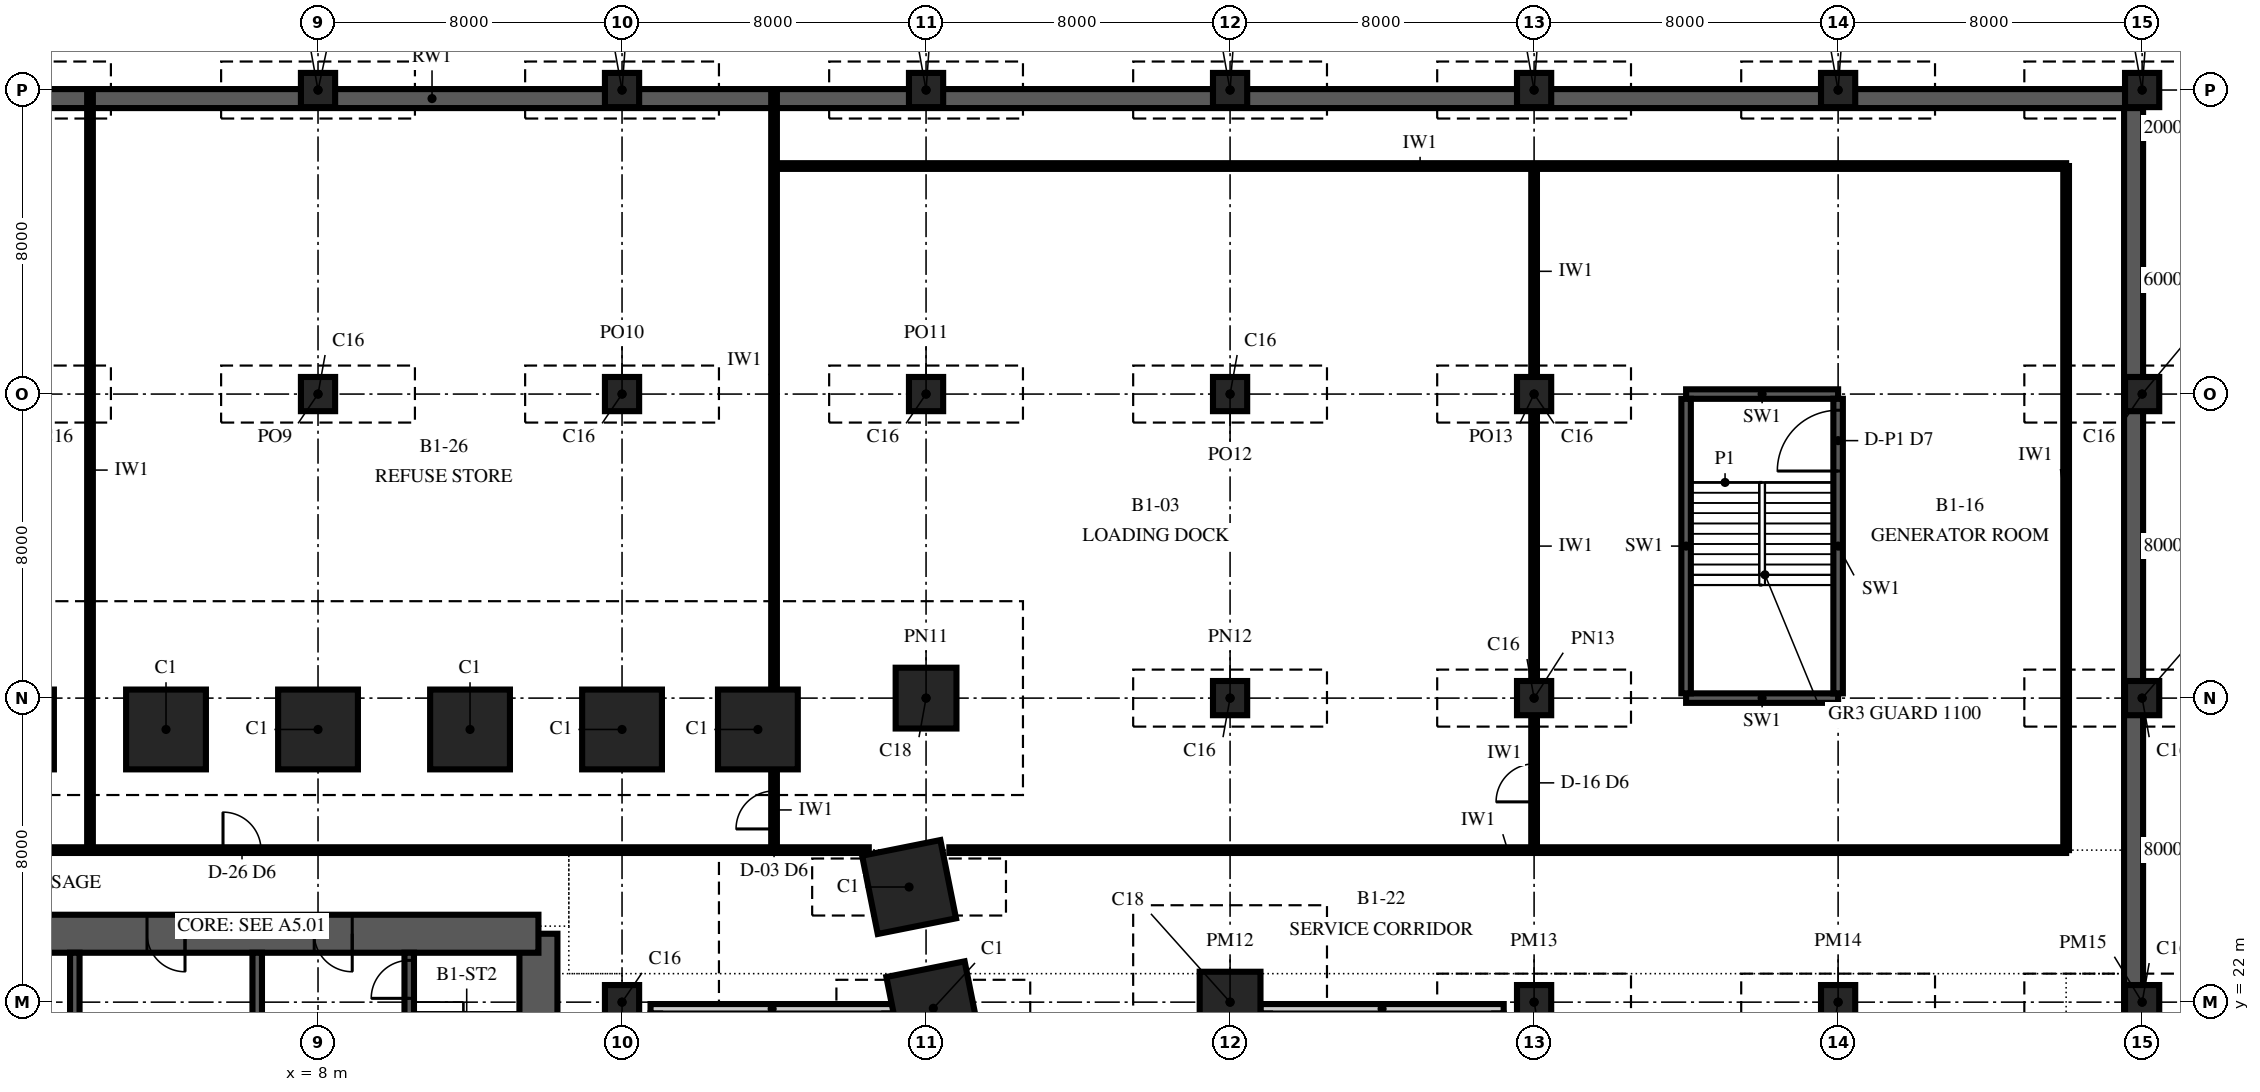
"""IFC4 building model, lengths in metres.
Left out: names, types, materials, properties, quantities, classifications, styles, units other than length and angle.
Written with IfcOpenShell. Run it as: python <this file> out.ifc"""

import sys

from ifc_helpers import new_model, si_unit, direction, frame, frame_2d, origin, origin_2d, place, context, subcontext, project, spatial, polyline, rectangle, outline, extrude, element, fill, save


model = new_model("IFC4")
c1 = context("Model", 3, precision=1e-05, world=origin(), true_north=direction((0.0, 1.0)))
c2 = subcontext(c1, "Body", "Model", "MODEL_VIEW")
j1 = project(units=[si_unit("LENGTHUNIT", "METRE"), si_unit("PLANEANGLEUNIT", "RADIAN")], contexts=[c1])
p1 = place(None, origin())
s1 = spatial("IfcSite", under=j1, at=p1, CompositionType="ELEMENT")
p2 = place(p1, origin())
s2 = spatial("IfcBuilding", under=s1, at=p2, CompositionType="ELEMENT")
p3 = place(p2, frame((0.0, 0.0, -7.0)))
s3 = spatial("IfcBuildingStorey", under=s2, at=p3, CompositionType="ELEMENT", Elevation=-7.0)
for number, where, z_axis, x_axis in (
    (1, (24.191, 21.838, -0.6), (0.0, 0.0, 1.0), (-0.196, 0.981, 0.0)),
    (2, (23.553, 25.029, -0.6), (0.0, 0.0, 1.0), (-0.196, 0.981, 0.0)),
    (3, (19.575, 29.175, -0.6), (0.0, 0.0, 1.0), (-1.0, 0.0, 0.0)),
    (4, (16.0, 29.175, -0.6), (0.0, 0.0, 1.0), (-1.0, 0.0, 0.0)),
    (5, (12.0, 29.175, -0.6), (0.0, 0.0, 1.0), (-1.0, 0.0, 0.0)),
    (6, (8.0, 29.175, -0.6), (0.0, 0.0, 1.0), (-1.0, 0.0, 0.0)),
    (7, (4.0, 29.175, -0.6), (0.0, 0.0, 1.0), (-1.0, 0.0, 0.0)),
    (8, (0.0, 29.175, -0.6), (0.0, 0.0, 1.0), (-1.0, 0.0, 0.0)),
):
    element("IfcColumn", number, at=place(p3, frame(where, z_axis=z_axis, x_axis=x_axis)), inside=s3, PredefinedType="COLUMN", context=c2, shape_type="SweptSolid", body=[
        extrude(rectangle(XDim=2.1, YDim=2.1, at=origin_2d()), origin(), (0.0, 0.0, 1.0), 7.6),
    ])
for number, where, z_axis, x_axis in (
    (9, (8.0, 38.0, -0.6), (0.0, 0.0, 1.0), (1.0, 0.0, 0.0)),
    (10, (8.0, 46.0, -0.6), (0.0, 0.0, 1.0), (1.0, 0.0, 0.0)),
    (11, (16.0, 22.0, -0.6), (0.0, 0.0, 1.0), (1.0, 0.0, 0.0)),
    (12, (16.0, 38.0, -0.6), (0.0, 0.0, 1.0), (1.0, 0.0, 0.0)),
    (13, (16.0, 46.0, -0.6), (0.0, 0.0, 1.0), (1.0, 0.0, 0.0)),
):
    element("IfcColumn", number, at=place(p3, frame(where, z_axis=z_axis, x_axis=x_axis)), inside=s3, PredefinedType="COLUMN", context=c2, shape_type="SweptSolid", body=[
        extrude(rectangle(XDim=0.9, YDim=0.9, at=origin_2d()), origin(), (0.0, 0.0, 1.0), 7.6),
    ])
p4 = place(p3, frame((24.0, 30.0, -0.6), z_axis=(0.0, 0.0, 1.0), x_axis=(1.0, 0.0, 0.0)))
e14 = element("IfcColumn", 14, at=p4, inside=s3, PredefinedType="COLUMN", context=c2, shape_type="SweptSolid", body=[
    extrude(rectangle(XDim=1.6, YDim=1.6, at=origin_2d()), origin(), (0.0, 0.0, 1.0), 7.6),
])
for number, where, z_axis, x_axis in (
    (15, (24.0, 38.0, -0.6), (0.0, 0.0, 1.0), (1.0, 0.0, 0.0)),
    (16, (24.0, 46.0, -0.6), (0.0, 0.0, 1.0), (1.0, 0.0, 0.0)),
):
    element("IfcColumn", number, at=place(p3, frame(where, z_axis=z_axis, x_axis=x_axis)), inside=s3, PredefinedType="COLUMN", context=c2, shape_type="SweptSolid", body=[
        extrude(rectangle(XDim=0.9, YDim=0.9, at=origin_2d()), origin(), (0.0, 0.0, 1.0), 7.6),
    ])
p5 = place(p3, frame((32.0, 22.0, -0.6), z_axis=(0.0, 0.0, 1.0), x_axis=(1.0, 0.0, 0.0)))
e17 = element("IfcColumn", 17, at=p5, inside=s3, PredefinedType="COLUMN", context=c2, shape_type="SweptSolid", body=[
    extrude(rectangle(XDim=1.6, YDim=1.6, at=origin_2d()), origin(), (0.0, 0.0, 1.0), 7.6),
])
for number, where, z_axis, x_axis in (
    (18, (32.0, 30.0, -0.6), (0.0, 0.0, 1.0), (1.0, 0.0, 0.0)),
    (19, (32.0, 38.0, -0.6), (0.0, 0.0, 1.0), (1.0, 0.0, 0.0)),
    (20, (32.0, 46.0, -0.6), (0.0, 0.0, 1.0), (1.0, 0.0, 0.0)),
    (21, (40.0, 22.0, -0.6), (0.0, 0.0, 1.0), (1.0, 0.0, 0.0)),
    (22, (40.0, 30.0, -0.6), (0.0, 0.0, 1.0), (1.0, 0.0, 0.0)),
    (23, (40.0, 38.0, -0.6), (0.0, 0.0, 1.0), (1.0, 0.0, 0.0)),
    (24, (40.0, 46.0, -0.6), (0.0, 0.0, 1.0), (1.0, 0.0, 0.0)),
    (25, (48.0, 22.0, -0.6), (0.0, 0.0, 1.0), (1.0, 0.0, 0.0)),
    (26, (48.0, 46.0, -0.6), (0.0, 0.0, 1.0), (1.0, 0.0, 0.0)),
    (27, (56.0, 22.0, -0.6), (0.0, 0.0, 1.0), (1.0, 0.0, 0.0)),
    (28, (56.0, 30.0, -0.6), (0.0, 0.0, 1.0), (1.0, 0.0, 0.0)),
    (29, (56.0, 38.0, -0.6), (0.0, 0.0, 1.0), (1.0, 0.0, 0.0)),
    (30, (56.0, 46.0, -0.6), (0.0, 0.0, 1.0), (1.0, 0.0, 0.0)),
):
    element("IfcColumn", number, at=place(p3, frame(where, z_axis=z_axis, x_axis=x_axis)), inside=s3, PredefinedType="COLUMN", context=c2, shape_type="SweptSolid", body=[
        extrude(rectangle(XDim=0.9, YDim=0.9, at=origin_2d()), origin(), (0.0, 0.0, 1.0), 7.6),
    ])
p6 = place(p3, frame((13.8, 6.2, 0.0), z_axis=(0.0, 0.0, 1.0), x_axis=(0.0, 1.0, 0.0)))
e31 = element("IfcWall", 31, at=p6, inside=s3, PredefinedType="SHEAR", context=c2, shape_type="SweptSolid", body=[
    extrude(outline(polyline([(0.0, -0.5), (17.6, -0.5), (17.6, 0.0), (17.1, 0.0), (17.1, 0.5), (0.5, 0.5), (0.5, 0.0), (0.0, 0.0), (0.0, -0.5)])), origin(), (0.0, 0.0, 1.0), 7.0),
])
p7 = place(p6, frame((4.1, 0.0, 0.0)))
e32 = element("IfcOpeningElement", 32, at=p7, cuts=e31, PredefinedType="OPENING", context=c2, shape_type="SweptSolid", body=[
    extrude(rectangle(XDim=1.8, YDim=2.4, at=frame_2d((0.9, 1.2))), frame((0.0, 0.515, 0.0), z_axis=(0.0, -1.0, 0.0), x_axis=(1.0, 0.0, 0.0)), (0.0, 0.0, 1.0), 1.03),
])
p8 = place(p3, frame((13.8, 23.8, 0.0), z_axis=(0.0, 0.0, 1.0), x_axis=(-1.0, 0.0, 0.0)))
e33 = element("IfcWall", 33, at=p8, inside=s3, PredefinedType="SHEAR", context=c2, shape_type="SweptSolid", body=[
    extrude(rectangle(XDim=27.6, YDim=1.0, at=frame_2d((13.8, 0.0))), origin(), (0.0, 0.0, 1.0), 7.0),
])
p9 = place(p8, frame((21.7, 0.0, 0.0)))
e34 = element("IfcOpeningElement", 34, at=p9, cuts=e33, PredefinedType="OPENING", context=c2, shape_type="SweptSolid", body=[
    extrude(rectangle(XDim=1.0, YDim=2.1, at=frame_2d((0.5, 1.05))), frame((0.0, 0.515, 0.0), z_axis=(0.0, -1.0, 0.0), x_axis=(1.0, 0.0, 0.0)), (0.0, 0.0, 1.0), 1.03),
])
p10 = place(p8, frame((4.9, 0.0, 0.0)))
e35 = element("IfcOpeningElement", 35, at=p10, cuts=e33, PredefinedType="OPENING", context=c2, shape_type="SweptSolid", body=[
    extrude(rectangle(XDim=1.0, YDim=2.1, at=frame_2d((0.5, 1.05))), frame((0.0, 0.515, 0.0), z_axis=(0.0, -1.0, 0.0), x_axis=(1.0, 0.0, 0.0)), (0.0, 0.0, 1.0), 1.03),
])
p11 = place(p8, frame((17.3, 0.0, 0.0)))
e36 = element("IfcOpeningElement", 36, at=p11, cuts=e33, PredefinedType="OPENING", context=c2, shape_type="SweptSolid", body=[
    extrude(rectangle(XDim=1.0, YDim=2.1, at=frame_2d((0.5, 1.05))), frame((0.0, 0.515, 0.0), z_axis=(0.0, -1.0, 0.0), x_axis=(1.0, 0.0, 0.0)), (0.0, 0.0, 1.0), 1.03),
])
p12 = place(p8, frame((13.3, 0.0, 0.0)))
e37 = element("IfcOpeningElement", 37, at=p12, cuts=e33, PredefinedType="OPENING", context=c2, shape_type="SweptSolid", body=[
    extrude(rectangle(XDim=1.0, YDim=2.1, at=frame_2d((0.5, 1.05))), frame((0.0, 0.515, 0.0), z_axis=(0.0, -1.0, 0.0), x_axis=(1.0, 0.0, 0.0)), (0.0, 0.0, 1.0), 1.03),
])
p13 = place(p8, frame((9.3, 0.0, 0.0)))
e38 = element("IfcOpeningElement", 38, at=p13, cuts=e33, PredefinedType="OPENING", context=c2, shape_type="SweptSolid", body=[
    extrude(rectangle(XDim=1.0, YDim=2.1, at=frame_2d((0.5, 1.05))), frame((0.0, 0.515, 0.0), z_axis=(0.0, -1.0, 0.0), x_axis=(1.0, 0.0, 0.0)), (0.0, 0.0, 1.0), 1.03),
])
for number, where, z_axis, x_axis in (
    (39, (1.6, 16.125, 0.0), (0.0, 0.0, 1.0), (0.0, 1.0, 0.0)),
    (40, (6.4, 16.125, 0.0), (0.0, 0.0, 1.0), (0.0, 1.0, 0.0)),
):
    element("IfcWall", number, at=place(p3, frame(where, z_axis=z_axis, x_axis=x_axis)), inside=s3, PredefinedType="SHEAR", context=c2, shape_type="SweptSolid", body=[
        extrude(rectangle(XDim=7.175, YDim=0.25, at=frame_2d((3.587, 0.0))), origin(), (0.0, 0.0, 1.0), 7.0),
    ])
p14 = place(p3, frame((10.4, 16.125, 0.0), z_axis=(0.0, 0.0, 1.0), x_axis=(0.0, 1.0, 0.0)))
e41 = element("IfcWall", 41, at=p14, inside=s3, PredefinedType="SHEAR", context=c2, shape_type="SweptSolid", body=[
    extrude(rectangle(XDim=7.175, YDim=0.25, at=frame_2d((3.587, 0.0))), origin(), (0.0, 0.0, 1.0), 7.0),
])
p15 = place(p14, frame((5.975, 0.0, 0.0)))
e42 = element("IfcOpeningElement", 42, at=p15, cuts=e41, PredefinedType="OPENING", context=c2, shape_type="SweptSolid", body=[
    extrude(rectangle(XDim=1.0, YDim=2.1, at=frame_2d((0.5, 1.05))), frame((0.0, 0.14, 0.0), z_axis=(0.0, -1.0, 0.0), x_axis=(1.0, 0.0, 0.0)), (0.0, 0.0, 1.0), 0.28),
])
p16 = place(p3, frame((55.775, -73.55, 0.0), z_axis=(0.0, 0.0, 1.0), x_axis=(0.0, 1.0, 0.0)))
e43 = element("IfcWall", 43, at=p16, inside=s3, PredefinedType="SOLIDWALL", context=c2, shape_type="SweptSolid", body=[
    extrude(rectangle(XDim=119.1, YDim=0.5, at=frame_2d((59.55, 0.0))), origin(), (0.0, 0.0, 1.0), 7.0),
])
p17 = place(p3, frame((56.0, 45.775, 0.0), z_axis=(0.0, 0.0, 1.0), x_axis=(-1.0, 0.0, 0.0)))
e44 = element("IfcWall", 44, at=p17, inside=s3, PredefinedType="SOLIDWALL", context=c2, shape_type="SweptSolid", body=[
    extrude(rectangle(XDim=90.0, YDim=0.5, at=frame_2d((45.0, 0.0))), origin(), (0.0, 0.0, 1.0), 7.0),
])
for number, where, z_axis, x_axis in (
    (45, (44.0, 30.0, 0.0), (0.0, 0.0, 1.0), (1.0, 0.0, 0.0)),
    (46, (48.0, 38.0, 0.0), (0.0, 0.0, 1.0), (-1.0, 0.0, 0.0)),
):
    element("IfcWall", number, at=place(p3, frame(where, z_axis=z_axis, x_axis=x_axis)), inside=s3, PredefinedType="SOLIDWALL", context=c2, shape_type="SweptSolid", body=[
        extrude(rectangle(XDim=4.0, YDim=0.25, at=frame_2d((2.0, 0.0))), origin(), (0.0, 0.0, 1.0), 7.0),
    ])
p18 = place(p3, frame((48.0, 30.125, 0.0), z_axis=(0.0, 0.0, 1.0), x_axis=(0.0, 1.0, 0.0)))
e47 = element("IfcWall", 47, at=p18, inside=s3, PredefinedType="SOLIDWALL", context=c2, shape_type="SweptSolid", body=[
    extrude(rectangle(XDim=7.75, YDim=0.25, at=frame_2d((3.875, 0.0))), origin(), (0.0, 0.0, 1.0), 7.0),
])
p19 = place(p18, frame((5.85, 0.0, 0.0)))
e48 = element("IfcOpeningElement", 48, at=p19, cuts=e47, PredefinedType="OPENING", context=c2, shape_type="SweptSolid", body=[
    extrude(rectangle(XDim=1.6, YDim=2.1, at=frame_2d((0.8, 1.05))), frame((0.0, 0.14, 0.0), z_axis=(0.0, -1.0, 0.0), x_axis=(1.0, 0.0, 0.0)), (0.0, 0.0, 1.0), 0.28),
])
p20 = place(p3, frame((44.0, 37.875, 0.0), z_axis=(0.0, 0.0, 1.0), x_axis=(0.0, -1.0, 0.0)))
e49 = element("IfcWall", 49, at=p20, inside=s3, PredefinedType="SOLIDWALL", context=c2, shape_type="SweptSolid", body=[
    extrude(rectangle(XDim=7.75, YDim=0.25, at=frame_2d((3.875, 0.0))), origin(), (0.0, 0.0, 1.0), 7.0),
])
p21 = place(p3, frame((23.15, 21.825, 0.0), z_axis=(0.0, 0.0, 1.0), x_axis=(-1.0, 0.0, 0.0)))
e50 = element("IfcWall", 50, at=p21, inside=s3, PredefinedType="SOLIDWALL", context=c2, shape_type="SweptSolid", body=[
    extrude(rectangle(XDim=6.4, YDim=0.25, at=frame_2d((3.2, 0.0))), origin(), (0.0, 0.0, 1.0), 7.0),
])
p22 = place(p3, frame((39.2, 21.825, 0.0), z_axis=(0.0, 0.0, 1.0), x_axis=(-1.0, 0.0, 0.0)))
e51 = element("IfcWall", 51, at=p22, inside=s3, PredefinedType="SOLIDWALL", context=c2, shape_type="SweptSolid", body=[
    extrude(rectangle(XDim=6.4, YDim=0.25, at=frame_2d((3.2, 0.0))), origin(), (0.0, 0.0, 1.0), 6.05),
])
p23 = place(p3, frame((2.0, 26.0, 0.0), z_axis=(0.0, 0.0, 1.0), x_axis=(0.0, 1.0, 0.0)))
e52 = element("IfcWall", 52, at=p23, inside=s3, PredefinedType="PARTITIONING", context=c2, shape_type="SweptSolid", body=[
    extrude(rectangle(XDim=20.0, YDim=0.15, at=frame_2d((10.0, 0.0))), origin(), (0.0, 0.0, 1.0), 6.7),
])
p24 = place(p3, frame((20.0, 26.0, 0.0), z_axis=(0.0, 0.0, 1.0), x_axis=(0.0, 1.0, 0.0)))
e53 = element("IfcWall", 53, at=p24, inside=s3, PredefinedType="PARTITIONING", context=c2, shape_type="SweptSolid", body=[
    extrude(rectangle(XDim=2.115, YDim=0.15, at=frame_2d((1.058, 0.0))), origin(), (0.0, 0.0, 1.0), 6.7),
])
p25 = place(p24, frame((0.558, 0.0, 0.0)))
e54 = element("IfcOpeningElement", 54, at=p25, cuts=e53, PredefinedType="OPENING", context=c2, shape_type="SweptSolid", body=[
    extrude(rectangle(XDim=1.0, YDim=2.1, at=frame_2d((0.5, 1.05))), frame((0.0, 0.09, 0.0), z_axis=(0.0, -1.0, 0.0), x_axis=(1.0, 0.0, 0.0)), (0.0, 0.0, 1.0), 0.18),
])
p26 = place(p3, frame((20.0, 30.235, 0.0), z_axis=(0.0, 0.0, 1.0), x_axis=(0.0, 1.0, 0.0)))
e55 = element("IfcWall", 55, at=p26, inside=s3, PredefinedType="PARTITIONING", context=c2, shape_type="SweptSolid", body=[
    extrude(rectangle(XDim=15.765, YDim=0.15, at=frame_2d((7.882, 0.0))), origin(), (0.0, 0.0, 1.0), 6.7),
])
p27 = place(p3, frame((40.0, 26.0, 0.0), z_axis=(0.0, 0.0, 1.0), x_axis=(0.0, 1.0, 0.0)))
e56 = element("IfcWall", 56, at=p27, inside=s3, PredefinedType="PARTITIONING", context=c2, shape_type="SweptSolid", body=[
    extrude(rectangle(XDim=3.54, YDim=0.15, at=frame_2d((1.77, 0.0))), origin(), (0.0, 0.0, 1.0), 6.05),
])
p28 = place(p27, frame((1.27, 0.0, 0.0)))
e57 = element("IfcOpeningElement", 57, at=p28, cuts=e56, PredefinedType="OPENING", context=c2, shape_type="SweptSolid", body=[
    extrude(rectangle(XDim=1.0, YDim=2.1, at=frame_2d((0.5, 1.05))), frame((0.0, 0.09, 0.0), z_axis=(0.0, -1.0, 0.0), x_axis=(1.0, 0.0, 0.0)), (0.0, 0.0, 1.0), 0.18),
])
p29 = place(p3, frame((40.0, 30.46, 0.0), z_axis=(0.0, 0.0, 1.0), x_axis=(0.0, 1.0, 0.0)))
e58 = element("IfcWall", 58, at=p29, inside=s3, PredefinedType="PARTITIONING", context=c2, shape_type="SweptSolid", body=[
    extrude(rectangle(XDim=7.08, YDim=0.15, at=frame_2d((3.54, 0.0))), origin(), (0.0, 0.0, 1.0), 6.05),
])
p30 = place(p3, frame((40.0, 38.46, 0.0), z_axis=(0.0, 0.0, 1.0), x_axis=(0.0, 1.0, 0.0)))
e59 = element("IfcWall", 59, at=p30, inside=s3, PredefinedType="PARTITIONING", context=c2, shape_type="SweptSolid", body=[
    extrude(rectangle(XDim=5.54, YDim=0.15, at=frame_2d((2.77, 0.0))), origin(), (0.0, 0.0, 1.0), 6.05),
])
p31 = place(p3, frame((54.0, 26.0, 0.0), z_axis=(0.0, 0.0, 1.0), x_axis=(0.0, 1.0, 0.0)))
e60 = element("IfcWall", 60, at=p31, inside=s3, PredefinedType="PARTITIONING", context=c2, shape_type="SweptSolid", body=[
    extrude(rectangle(XDim=18.0, YDim=0.15, at=frame_2d((9.0, 0.0))), origin(), (0.0, 0.0, 1.0), 6.7),
])
p32 = place(p3, frame((-22.493, 26.0, 0.0), z_axis=(0.0, 0.0, 1.0), x_axis=(1.0, 0.0, 0.0)))
e61 = element("IfcWall", 61, at=p32, inside=s3, PredefinedType="PARTITIONING", context=c2, shape_type="SweptSolid", body=[
    extrude(rectangle(XDim=44.986, YDim=0.15, at=frame_2d((22.493, 0.0))), origin(), (0.0, 0.0, 1.0), 6.7),
])
p33 = place(p32, frame((15.993, 0.0, 0.0)))
e62 = element("IfcOpeningElement", 62, at=p33, cuts=e61, PredefinedType="OPENING", context=c2, shape_type="SweptSolid", body=[
    extrude(rectangle(XDim=1.0, YDim=2.1, at=frame_2d((0.5, 1.05))), frame((0.0, 0.09, 0.0), z_axis=(0.0, -1.0, 0.0), x_axis=(1.0, 0.0, 0.0)), (0.0, 0.0, 1.0), 0.18),
])
p34 = place(p32, frame((27.993, 0.0, 0.0)))
e63 = element("IfcOpeningElement", 63, at=p34, cuts=e61, PredefinedType="OPENING", context=c2, shape_type="SweptSolid", body=[
    extrude(rectangle(XDim=1.0, YDim=2.1, at=frame_2d((0.5, 1.05))), frame((0.0, 0.09, 0.0), z_axis=(0.0, -1.0, 0.0), x_axis=(1.0, 0.0, 0.0)), (0.0, 0.0, 1.0), 0.18),
])
p35 = place(p3, frame((24.613, 26.0, 0.0), z_axis=(0.0, 0.0, 1.0), x_axis=(1.0, 0.0, 0.0)))
e64 = element("IfcWall", 64, at=p35, inside=s3, PredefinedType="PARTITIONING", context=c2, shape_type="SweptSolid", body=[
    extrude(rectangle(XDim=29.387, YDim=0.15, at=frame_2d((14.694, 0.0))), origin(), (0.0, 0.0, 1.0), 6.7),
])
p36 = place(p3, frame((20.0, 44.0, 0.0), z_axis=(0.0, 0.0, 1.0), x_axis=(1.0, 0.0, 0.0)))
e65 = element("IfcWall", 65, at=p36, inside=s3, PredefinedType="PARTITIONING", context=c2, shape_type="SweptSolid", body=[
    extrude(rectangle(XDim=34.0, YDim=0.15, at=frame_2d((17.0, 0.0))), origin(), (0.0, 0.0, 1.0), 6.7),
])
p37 = place(p10, origin())
e66 = element("IfcDoor", 66, at=p37, inside=s3, OperationType="SINGLE_SWING_RIGHT", PredefinedType="DOOR", context=c2, shape_type="SweptSolid", body=[
    extrude(rectangle(XDim=1.0, YDim=2.1, at=frame_2d((0.5, 1.05))), frame((0.0, 0.5, 0.0), z_axis=(0.0, -1.0, 0.0), x_axis=(1.0, 0.0, 0.0)), (0.0, 0.0, 1.0), 1.0),
])
fill(e35, e66)
p38 = place(p13, origin())
e67 = element("IfcDoor", 67, at=p38, inside=s3, OperationType="SINGLE_SWING_LEFT", PredefinedType="DOOR", context=c2, shape_type="SweptSolid", body=[
    extrude(rectangle(XDim=1.0, YDim=2.1, at=frame_2d((0.5, 1.05))), frame((0.0, 0.5, 0.0), z_axis=(0.0, -1.0, 0.0), x_axis=(1.0, 0.0, 0.0)), (0.0, 0.0, 1.0), 1.0),
])
fill(e38, e67)
p39 = place(p15, origin())
e68 = element("IfcDoor", 68, at=p39, inside=s3, OperationType="SINGLE_SWING_LEFT", PredefinedType="DOOR", context=c2, shape_type="SweptSolid", body=[
    extrude(rectangle(XDim=1.0, YDim=2.1, at=frame_2d((0.5, 1.05))), frame((0.0, 0.125, 0.0), z_axis=(0.0, -1.0, 0.0), x_axis=(1.0, 0.0, 0.0)), (0.0, 0.0, 1.0), 0.25),
])
fill(e42, e68)
p40 = place(p19, origin())
e69 = element("IfcDoor", 69, at=p40, inside=s3, OperationType="DOUBLE_DOOR_SINGLE_SWING", PredefinedType="DOOR", context=c2, shape_type="SweptSolid", body=[
    extrude(rectangle(XDim=1.6, YDim=2.1, at=frame_2d((0.8, 1.05))), frame((0.0, 0.125, 0.0), z_axis=(0.0, -1.0, 0.0), x_axis=(1.0, 0.0, 0.0)), (0.0, 0.0, 1.0), 0.25),
])
fill(e48, e69)
p41 = place(p25, origin())
e70 = element("IfcDoor", 70, at=p41, inside=s3, OperationType="SINGLE_SWING_LEFT", PredefinedType="DOOR", context=c2, shape_type="SweptSolid", body=[
    extrude(rectangle(XDim=1.0, YDim=2.1, at=frame_2d((0.5, 1.05))), frame((0.0, 0.075, 0.0), z_axis=(0.0, -1.0, 0.0), x_axis=(1.0, 0.0, 0.0)), (0.0, 0.0, 1.0), 0.149),
])
fill(e54, e70)
p42 = place(p28, origin())
e71 = element("IfcDoor", 71, at=p42, inside=s3, OperationType="SINGLE_SWING_LEFT", PredefinedType="DOOR", context=c2, shape_type="SweptSolid", body=[
    extrude(rectangle(XDim=1.0, YDim=2.1, at=frame_2d((0.5, 1.05))), frame((0.0, 0.075, 0.0), z_axis=(0.0, -1.0, 0.0), x_axis=(1.0, 0.0, 0.0)), (0.0, 0.0, 1.0), 0.149),
])
fill(e57, e71)
p43 = place(p34, origin())
e72 = element("IfcDoor", 72, at=p43, inside=s3, OperationType="SINGLE_SWING_LEFT", PredefinedType="DOOR", context=c2, shape_type="SweptSolid", body=[
    extrude(rectangle(XDim=1.0, YDim=2.1, at=frame_2d((0.5, 1.05))), frame((0.0, 0.075, 0.0), z_axis=(0.0, -1.0, 0.0), x_axis=(1.0, 0.0, 0.0)), (0.0, 0.0, 1.0), 0.149),
])
fill(e63, e72)
save(model, sys.argv[1])
